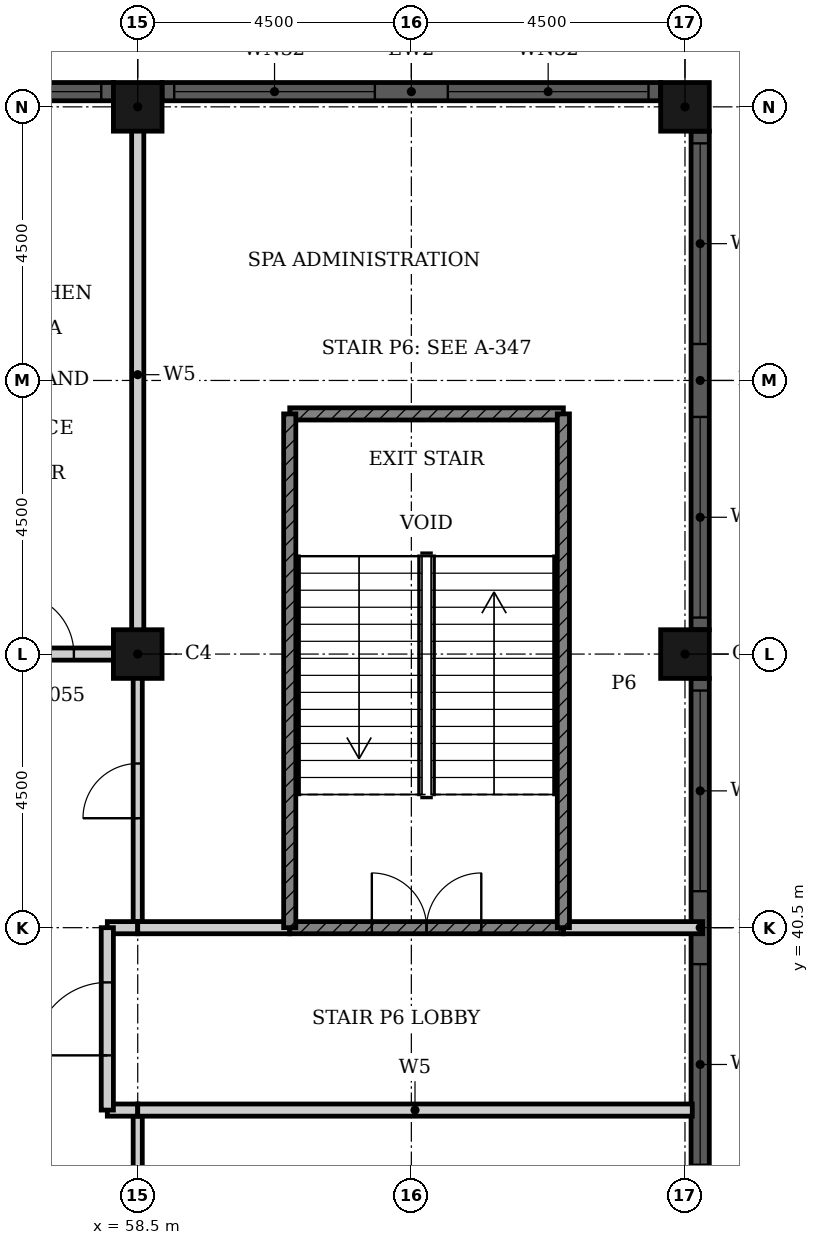
"""IFC4 building model, lengths in metres.
Left out: names, types, materials, properties, quantities, classifications, styles, units other than length and angle.
Written with IfcOpenShell. Run it as: python <this file> out.ifc"""

import sys

from ifc_helpers import new_model, si_unit, direction, frame, frame_2d, origin, origin_2d, place, context, subcontext, project, spatial, rectangle, hollow_rectangle, extrude, element, fill, save


model = new_model("IFC4")
c1 = context("Model", 3, precision=1e-05, world=origin(), true_north=direction((0.0, 1.0)))
c2 = subcontext(c1, "Body", "Model", "MODEL_VIEW")
j1 = project(units=[si_unit("LENGTHUNIT", "METRE"), si_unit("PLANEANGLEUNIT", "RADIAN")], contexts=[c1])
p1 = place(None, origin())
s1 = spatial("IfcSite", under=j1, at=p1, CompositionType="ELEMENT")
p2 = place(p1, origin())
s2 = spatial("IfcBuilding", under=s1, at=p2, CompositionType="ELEMENT")
p3 = place(p2, frame((0.0, 0.0, 24.0)))
s3 = spatial("IfcBuildingStorey", under=s2, at=p3, CompositionType="ELEMENT", Elevation=24.0)
for number, where, z_axis, x_axis in (
    (1, (58.5, 54.0, 0.0), (0.0, 0.0, 1.0), (1.0, 0.0, 0.0)),
    (2, (67.5, 45.0, 0.0), (0.0, 0.0, 1.0), (1.0, 0.0, 0.0)),
    (3, (67.5, 54.0, 0.0), (0.0, 0.0, 1.0), (1.0, 0.0, 0.0)),
    (4, (58.5, 45.0, 0.0), (0.0, 0.0, 1.0), (1.0, 0.0, 0.0)),
):
    element("IfcColumn", number, at=place(p3, frame(where, z_axis=z_axis, x_axis=x_axis)), inside=s3, PredefinedType="COLUMN", context=c2, shape_type="SweptSolid", body=[
        extrude(hollow_rectangle(XDim=0.8, YDim=0.8, WallThickness=0.025, at=origin_2d()), origin(), (0.0, 0.0, 1.0), 4.8),
    ])
p4 = place(p3, frame((67.75, 36.4, 0.0), z_axis=(0.0, 0.0, 1.0), x_axis=(0.0, 1.0, 0.0)))
e5 = element("IfcWall", 5, at=p4, inside=s3, PredefinedType="SOLIDWALL", context=c2, shape_type="SweptSolid", body=[
    extrude(rectangle(XDim=8.2, YDim=0.3, at=frame_2d((4.1, 0.0))), origin(), (0.0, 0.0, 1.0), 4.8),
])
p5 = place(p4, frame((0.2, 0.0, 0.9)))
e6 = element("IfcOpeningElement", 6, at=p5, cuts=e5, PredefinedType="OPENING", context=c2, shape_type="SweptSolid", body=[
    extrude(rectangle(XDim=3.3, YDim=2.9, at=frame_2d((1.65, 1.45))), frame((0.0, 0.16, 0.0), z_axis=(0.0, -1.0, 0.0), x_axis=(1.0, 0.0, 0.0)), (0.0, 0.0, 1.0), 0.32),
])
p6 = place(p4, frame((4.7, 0.0, 0.9)))
e7 = element("IfcOpeningElement", 7, at=p6, cuts=e5, PredefinedType="OPENING", context=c2, shape_type="SweptSolid", body=[
    extrude(rectangle(XDim=3.3, YDim=2.9, at=frame_2d((1.65, 1.45))), frame((0.0, 0.16, 0.0), z_axis=(0.0, -1.0, 0.0), x_axis=(1.0, 0.0, 0.0)), (0.0, 0.0, 1.0), 0.32),
])
p7 = place(p3, frame((67.75, 45.4, 0.0), z_axis=(0.0, 0.0, 1.0), x_axis=(0.0, 1.0, 0.0)))
e8 = element("IfcWall", 8, at=p7, inside=s3, PredefinedType="SOLIDWALL", context=c2, shape_type="SweptSolid", body=[
    extrude(rectangle(XDim=8.2, YDim=0.3, at=frame_2d((4.1, 0.0))), origin(), (0.0, 0.0, 1.0), 4.8),
])
p8 = place(p7, frame((0.2, 0.0, 0.9)))
e9 = element("IfcOpeningElement", 9, at=p8, cuts=e8, PredefinedType="OPENING", context=c2, shape_type="SweptSolid", body=[
    extrude(rectangle(XDim=3.3, YDim=2.9, at=frame_2d((1.65, 1.45))), frame((0.0, 0.16, 0.0), z_axis=(0.0, -1.0, 0.0), x_axis=(1.0, 0.0, 0.0)), (0.0, 0.0, 1.0), 0.32),
])
p9 = place(p7, frame((4.7, 0.0, 0.9)))
e10 = element("IfcOpeningElement", 10, at=p9, cuts=e8, PredefinedType="OPENING", context=c2, shape_type="SweptSolid", body=[
    extrude(rectangle(XDim=3.3, YDim=2.9, at=frame_2d((1.65, 1.45))), frame((0.0, 0.16, 0.0), z_axis=(0.0, -1.0, 0.0), x_axis=(1.0, 0.0, 0.0)), (0.0, 0.0, 1.0), 0.32),
])
p10 = place(p3, frame((67.1, 54.25, 0.0), z_axis=(0.0, 0.0, 1.0), x_axis=(-1.0, 0.0, 0.0)))
e11 = element("IfcWall", 11, at=p10, inside=s3, PredefinedType="SOLIDWALL", context=c2, shape_type="SweptSolid", body=[
    extrude(rectangle(XDim=8.2, YDim=0.3, at=frame_2d((4.1, 0.0))), origin(), (0.0, 0.0, 1.0), 4.8),
])
p11 = place(p10, frame((0.2, 0.0, 0.9)))
e12 = element("IfcOpeningElement", 12, at=p11, cuts=e11, PredefinedType="OPENING", context=c2, shape_type="SweptSolid", body=[
    extrude(rectangle(XDim=3.3, YDim=2.9, at=frame_2d((1.65, 1.45))), frame((0.0, 0.16, 0.0), z_axis=(0.0, -1.0, 0.0), x_axis=(1.0, 0.0, 0.0)), (0.0, 0.0, 1.0), 0.32),
])
p12 = place(p10, frame((4.7, 0.0, 0.9)))
e13 = element("IfcOpeningElement", 13, at=p12, cuts=e11, PredefinedType="OPENING", context=c2, shape_type="SweptSolid", body=[
    extrude(rectangle(XDim=3.3, YDim=2.9, at=frame_2d((1.65, 1.45))), frame((0.0, 0.16, 0.0), z_axis=(0.0, -1.0, 0.0), x_axis=(1.0, 0.0, 0.0)), (0.0, 0.0, 1.0), 0.32),
])
p13 = place(p3, frame((58.1, 54.25, 0.0), z_axis=(0.0, 0.0, 1.0), x_axis=(-1.0, 0.0, 0.0)))
e14 = element("IfcWall", 14, at=p13, inside=s3, PredefinedType="SOLIDWALL", context=c2, shape_type="SweptSolid", body=[
    extrude(rectangle(XDim=8.2, YDim=0.3, at=frame_2d((4.1, 0.0))), origin(), (0.0, 0.0, 1.0), 4.8),
])
p14 = place(p13, frame((0.2, 0.0, 0.9)))
e15 = element("IfcOpeningElement", 15, at=p14, cuts=e14, PredefinedType="OPENING", context=c2, shape_type="SweptSolid", body=[
    extrude(rectangle(XDim=3.3, YDim=2.9, at=frame_2d((1.65, 1.45))), frame((0.0, 0.16, 0.0), z_axis=(0.0, -1.0, 0.0), x_axis=(1.0, 0.0, 0.0)), (0.0, 0.0, 1.0), 0.32),
])
p15 = place(p13, frame((4.7, 0.0, 0.9)))
e16 = element("IfcOpeningElement", 16, at=p15, cuts=e14, PredefinedType="OPENING", context=c2, shape_type="SweptSolid", body=[
    extrude(rectangle(XDim=3.3, YDim=2.9, at=frame_2d((1.65, 1.45))), frame((0.0, 0.16, 0.0), z_axis=(0.0, -1.0, 0.0), x_axis=(1.0, 0.0, 0.0)), (0.0, 0.0, 1.0), 0.32),
])
p16 = place(p3, frame((58.5, 30.4, 0.0), z_axis=(0.0, 0.0, 1.0), x_axis=(0.0, 1.0, 0.0)))
e17 = element("IfcWall", 17, at=p16, inside=s3, PredefinedType="PARTITIONING", context=c2, shape_type="SweptSolid", body=[
    extrude(rectangle(XDim=7.1, YDim=0.15, at=frame_2d((3.55, 0.0))), origin(), (0.0, 0.0, 1.0), 4.45),
])
p17 = place(p16, frame((1.25, 0.0, 0.0)))
e18 = element("IfcOpeningElement", 18, at=p17, cuts=e17, PredefinedType="OPENING", context=c2, shape_type="SweptSolid", body=[
    extrude(rectangle(XDim=1.0, YDim=2.1, at=frame_2d((0.5, 1.05))), frame((0.0, 0.085, 0.0), z_axis=(0.0, -1.0, 0.0), x_axis=(1.0, 0.0, 0.0)), (0.0, 0.0, 1.0), 0.17),
])
p18 = place(p3, frame((58.5, 40.5, 0.0), z_axis=(0.0, 0.0, 1.0), x_axis=(0.0, 1.0, 0.0)))
e19 = element("IfcWall", 19, at=p18, inside=s3, PredefinedType="PARTITIONING", context=c2, shape_type="SweptSolid", body=[
    extrude(rectangle(XDim=4.5, YDim=0.15, at=frame_2d((2.25, 0.0))), origin(), (0.0, 0.0, 1.0), 4.45),
])
p19 = place(p18, frame((1.8, 0.0, 0.0)))
e20 = element("IfcOpeningElement", 20, at=p19, cuts=e19, PredefinedType="OPENING", context=c2, shape_type="SweptSolid", body=[
    extrude(rectangle(XDim=0.9, YDim=2.1, at=frame_2d((0.45, 1.05))), frame((0.0, 0.085, 0.0), z_axis=(0.0, -1.0, 0.0), x_axis=(1.0, 0.0, 0.0)), (0.0, 0.0, 1.0), 0.17),
])
p20 = place(p3, frame((58.0, 37.5, 0.0), z_axis=(0.0, 0.0, 1.0), x_axis=(1.0, 0.0, 0.0)))
e21 = element("IfcWall", 21, at=p20, inside=s3, PredefinedType="PARTITIONING", context=c2, shape_type="SweptSolid", body=[
    extrude(rectangle(XDim=0.5, YDim=0.2, at=frame_2d((0.25, 0.0))), origin(), (0.0, 0.0, 1.0), 4.45),
])
p21 = place(p3, frame((58.5, 37.5, 0.0), z_axis=(0.0, 0.0, 1.0), x_axis=(1.0, 0.0, 0.0)))
e22 = element("IfcWall", 22, at=p21, inside=s3, PredefinedType="PARTITIONING", context=c2, shape_type="SweptSolid", body=[
    extrude(rectangle(XDim=9.12, YDim=0.2, at=frame_2d((4.56, 0.0))), origin(), (0.0, 0.0, 1.0), 4.45),
])
p22 = place(p3, frame((58.0, 40.5, 0.0), z_axis=(0.0, 0.0, 1.0), x_axis=(1.0, 0.0, 0.0)))
e23 = element("IfcWall", 23, at=p22, inside=s3, PredefinedType="PARTITIONING", context=c2, shape_type="SweptSolid", body=[
    extrude(rectangle(XDim=0.5, YDim=0.2, at=frame_2d((0.25, 0.0))), origin(), (0.0, 0.0, 1.0), 4.45),
])
p23 = place(p3, frame((58.5, 40.5, 0.0), z_axis=(0.0, 0.0, 1.0), x_axis=(1.0, 0.0, 0.0)))
e24 = element("IfcWall", 24, at=p23, inside=s3, PredefinedType="PARTITIONING", context=c2, shape_type="SweptSolid", body=[
    extrude(rectangle(XDim=2.5, YDim=0.2, at=frame_2d((1.25, 0.0))), origin(), (0.0, 0.0, 1.0), 4.45),
])
p24 = place(p3, frame((65.5, 40.5, 0.0), z_axis=(0.0, 0.0, 1.0), x_axis=(1.0, 0.0, 0.0)))
e25 = element("IfcWall", 25, at=p24, inside=s3, PredefinedType="PARTITIONING", context=c2, shape_type="SweptSolid", body=[
    extrude(rectangle(XDim=2.29, YDim=0.2, at=frame_2d((1.145, 0.0))), origin(), (0.0, 0.0, 1.0), 4.45),
])
p25 = place(p3, frame((55.4, 45.0, 0.0), z_axis=(0.0, 0.0, 1.0), x_axis=(1.0, 0.0, 0.0)))
e26 = element("IfcWall", 26, at=p25, inside=s3, PredefinedType="PARTITIONING", context=c2, shape_type="SweptSolid", body=[
    extrude(rectangle(XDim=3.1, YDim=0.2, at=frame_2d((1.55, 0.0))), origin(), (0.0, 0.0, 1.0), 4.45),
])
p26 = place(p25, frame((1.05, 0.0, 0.0)))
e27 = element("IfcOpeningElement", 27, at=p26, cuts=e26, PredefinedType="OPENING", context=c2, shape_type="SweptSolid", body=[
    extrude(rectangle(XDim=1.0, YDim=2.1, at=frame_2d((0.5, 1.05))), frame((0.0, 0.11, 0.0), z_axis=(0.0, -1.0, 0.0), x_axis=(1.0, 0.0, 0.0)), (0.0, 0.0, 1.0), 0.22),
])
p27 = place(p3, frame((58.0, 37.5, 0.0), z_axis=(0.0, 0.0, 1.0), x_axis=(0.0, 1.0, 0.0)))
e28 = element("IfcWall", 28, at=p27, inside=s3, PredefinedType="PARTITIONING", context=c2, shape_type="SweptSolid", body=[
    extrude(rectangle(XDim=3.0, YDim=0.2, at=frame_2d((1.5, 0.0))), origin(), (0.0, 0.0, 1.0), 4.45),
])
p28 = place(p27, frame((0.9, 0.0, 0.0)))
e29 = element("IfcOpeningElement", 29, at=p28, cuts=e28, PredefinedType="OPENING", context=c2, shape_type="SweptSolid", body=[
    extrude(rectangle(XDim=1.2, YDim=2.1, at=frame_2d((0.6, 1.05))), frame((0.0, 0.11, 0.0), z_axis=(0.0, -1.0, 0.0), x_axis=(1.0, 0.0, 0.0)), (0.0, 0.0, 1.0), 0.22),
])
p29 = place(p3, frame((58.5, 45.0, 0.0), z_axis=(0.0, 0.0, 1.0), x_axis=(0.0, 1.0, 0.0)))
e30 = element("IfcWall", 30, at=p29, inside=s3, PredefinedType="PARTITIONING", context=c2, shape_type="SweptSolid", body=[
    extrude(rectangle(XDim=9.19, YDim=0.2, at=frame_2d((4.595, 0.0))), origin(), (0.0, 0.0, 1.0), 4.45),
])
p30 = place(p3, frame((61.0, 40.5, 0.0), z_axis=(0.0, 0.0, 1.0), x_axis=(1.0, 0.0, 0.0)))
e31 = element("IfcWall", 31, at=p30, inside=s3, PredefinedType="SHEAR", context=c2, shape_type="SweptSolid", body=[
    extrude(rectangle(XDim=4.5, YDim=0.2, at=frame_2d((2.25, 0.0))), origin(), (0.0, 0.0, 1.0), 4.45),
])
p31 = place(p30, frame((1.35, 0.0, 0.0)))
e32 = element("IfcOpeningElement", 32, at=p31, cuts=e31, PredefinedType="OPENING", context=c2, shape_type="SweptSolid", body=[
    extrude(rectangle(XDim=1.8, YDim=2.1, at=frame_2d((0.9, 1.05))), frame((0.0, 0.11, 0.0), z_axis=(0.0, -1.0, 0.0), x_axis=(1.0, 0.0, 0.0)), (0.0, 0.0, 1.0), 0.22),
])
p32 = place(p3, frame((61.0, 48.95, 0.0), z_axis=(0.0, 0.0, 1.0), x_axis=(1.0, 0.0, 0.0)))
e33 = element("IfcWall", 33, at=p32, inside=s3, PredefinedType="SHEAR", context=c2, shape_type="SweptSolid", body=[
    extrude(rectangle(XDim=4.5, YDim=0.2, at=frame_2d((2.25, 0.0))), origin(), (0.0, 0.0, 1.0), 4.45),
])
for number, where, z_axis, x_axis in (
    (34, (61.0, 40.5, 0.0), (0.0, 0.0, 1.0), (0.0, 1.0, 0.0)),
    (35, (65.5, 40.5, 0.0), (0.0, 0.0, 1.0), (0.0, 1.0, 0.0)),
):
    element("IfcWall", number, at=place(p3, frame(where, z_axis=z_axis, x_axis=x_axis)), inside=s3, PredefinedType="SHEAR", context=c2, shape_type="SweptSolid", body=[
        extrude(rectangle(XDim=8.45, YDim=0.2, at=frame_2d((4.225, 0.0))), origin(), (0.0, 0.0, 1.0), 4.45),
    ])
p33 = place(p5, origin())
e36 = element("IfcWindow", 36, at=p33, inside=s3, PartitioningType="SINGLE_PANEL", PredefinedType="WINDOW", context=c2, shape_type="SweptSolid", body=[
    extrude(rectangle(XDim=3.3, YDim=2.9, at=frame_2d((1.65, 1.45))), frame((0.0, 0.03, 0.0), z_axis=(0.0, -1.0, 0.0), x_axis=(1.0, 0.0, 0.0)), (0.0, 0.0, 1.0), 0.06),
])
fill(e6, e36)
p34 = place(p6, origin())
e37 = element("IfcWindow", 37, at=p34, inside=s3, PartitioningType="SINGLE_PANEL", PredefinedType="WINDOW", context=c2, shape_type="SweptSolid", body=[
    extrude(rectangle(XDim=3.3, YDim=2.9, at=frame_2d((1.65, 1.45))), frame((0.0, 0.03, 0.0), z_axis=(0.0, -1.0, 0.0), x_axis=(1.0, 0.0, 0.0)), (0.0, 0.0, 1.0), 0.06),
])
fill(e7, e37)
p35 = place(p8, origin())
e38 = element("IfcWindow", 38, at=p35, inside=s3, PartitioningType="SINGLE_PANEL", PredefinedType="WINDOW", context=c2, shape_type="SweptSolid", body=[
    extrude(rectangle(XDim=3.3, YDim=2.9, at=frame_2d((1.65, 1.45))), frame((0.0, 0.03, 0.0), z_axis=(0.0, -1.0, 0.0), x_axis=(1.0, 0.0, 0.0)), (0.0, 0.0, 1.0), 0.06),
])
fill(e9, e38)
p36 = place(p9, origin())
e39 = element("IfcWindow", 39, at=p36, inside=s3, PartitioningType="SINGLE_PANEL", PredefinedType="WINDOW", context=c2, shape_type="SweptSolid", body=[
    extrude(rectangle(XDim=3.3, YDim=2.9, at=frame_2d((1.65, 1.45))), frame((0.0, 0.03, 0.0), z_axis=(0.0, -1.0, 0.0), x_axis=(1.0, 0.0, 0.0)), (0.0, 0.0, 1.0), 0.06),
])
fill(e10, e39)
p37 = place(p11, origin())
e40 = element("IfcWindow", 40, at=p37, inside=s3, PartitioningType="SINGLE_PANEL", PredefinedType="WINDOW", context=c2, shape_type="SweptSolid", body=[
    extrude(rectangle(XDim=3.3, YDim=2.9, at=frame_2d((1.65, 1.45))), frame((0.0, 0.03, 0.0), z_axis=(0.0, -1.0, 0.0), x_axis=(1.0, 0.0, 0.0)), (0.0, 0.0, 1.0), 0.06),
])
fill(e12, e40)
p38 = place(p12, origin())
e41 = element("IfcWindow", 41, at=p38, inside=s3, PartitioningType="SINGLE_PANEL", PredefinedType="WINDOW", context=c2, shape_type="SweptSolid", body=[
    extrude(rectangle(XDim=3.3, YDim=2.9, at=frame_2d((1.65, 1.45))), frame((0.0, 0.03, 0.0), z_axis=(0.0, -1.0, 0.0), x_axis=(1.0, 0.0, 0.0)), (0.0, 0.0, 1.0), 0.06),
])
fill(e13, e41)
p39 = place(p14, origin())
e42 = element("IfcWindow", 42, at=p39, inside=s3, PartitioningType="SINGLE_PANEL", PredefinedType="WINDOW", context=c2, shape_type="SweptSolid", body=[
    extrude(rectangle(XDim=3.3, YDim=2.9, at=frame_2d((1.65, 1.45))), frame((0.0, 0.03, 0.0), z_axis=(0.0, -1.0, 0.0), x_axis=(1.0, 0.0, 0.0)), (0.0, 0.0, 1.0), 0.06),
])
fill(e15, e42)
p40 = place(p28, origin())
e43 = element("IfcDoor", 43, at=p40, inside=s3, OperationType="SINGLE_SWING_RIGHT", PredefinedType="DOOR", context=c2, shape_type="SweptSolid", body=[
    extrude(rectangle(XDim=1.2, YDim=2.1, at=frame_2d((0.6, 1.05))), frame((0.0, 0.025, 0.0), z_axis=(0.0, -1.0, 0.0), x_axis=(1.0, 0.0, 0.0)), (0.0, 0.0, 1.0), 0.05),
])
fill(e29, e43)
p41 = place(p31, origin())
e44 = element("IfcDoor", 44, at=p41, inside=s3, OperationType="DOUBLE_DOOR_SINGLE_SWING", PredefinedType="DOOR", context=c2, shape_type="SweptSolid", body=[
    extrude(rectangle(XDim=1.8, YDim=2.1, at=frame_2d((0.9, 1.05))), frame((0.0, 0.025, 0.0), z_axis=(0.0, -1.0, 0.0), x_axis=(1.0, 0.0, 0.0)), (0.0, 0.0, 1.0), 0.05),
])
fill(e32, e44)
p42 = place(p19, origin())
e45 = element("IfcDoor", 45, at=p42, inside=s3, OperationType="SINGLE_SWING_LEFT", PredefinedType="DOOR", context=c2, shape_type="SweptSolid", body=[
    extrude(rectangle(XDim=0.9, YDim=2.1, at=frame_2d((0.45, 1.05))), frame((0.0, 0.025, 0.0), z_axis=(0.0, -1.0, 0.0), x_axis=(1.0, 0.0, 0.0)), (0.0, 0.0, 1.0), 0.05),
])
fill(e20, e45)
p43 = place(p26, origin())
e46 = element("IfcDoor", 46, at=p43, inside=s3, OperationType="SINGLE_SWING_LEFT", PredefinedType="DOOR", context=c2, shape_type="SweptSolid", body=[
    extrude(rectangle(XDim=1.0, YDim=2.1, at=frame_2d((0.5, 1.05))), frame((0.0, 0.025, 0.0), z_axis=(0.0, -1.0, 0.0), x_axis=(1.0, 0.0, 0.0)), (0.0, 0.0, 1.0), 0.05),
])
fill(e27, e46)
save(model, sys.argv[1])
